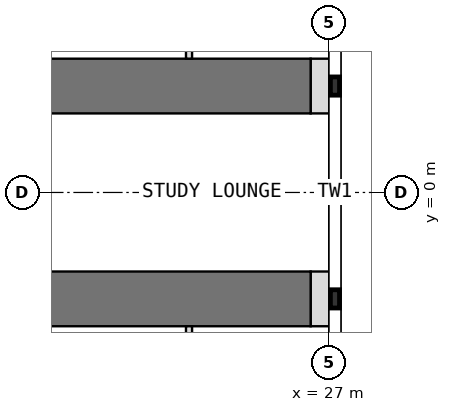
"""IFC4 building model, lengths in metres.
Left out: names, types, materials, properties, quantities, classifications, styles, units other than length and angle.
Written with IfcOpenShell. Run it as: python <this file> out.ifc"""

import sys

from ifc_helpers import new_model, si_unit, direction, frame, frame_2d, origin, place, context, subcontext, project, spatial, rectangle, extrude, element, save


model = new_model("IFC4")
c1 = context("Model", 3, precision=1e-05, world=origin(), true_north=direction((0.0, 1.0)))
c2 = subcontext(c1, "Body", "Model", "MODEL_VIEW")
j1 = project(units=[si_unit("LENGTHUNIT", "METRE"), si_unit("PLANEANGLEUNIT", "RADIAN")], contexts=[c1])
p1 = place(None, origin())
s1 = spatial("IfcSite", under=j1, at=p1, CompositionType="ELEMENT")
p2 = place(p1, origin())
s2 = spatial("IfcBuilding", under=s1, at=p2, CompositionType="ELEMENT")
p3 = place(p2, frame((0.0, 0.0, 84.5)))
s3 = spatial("IfcBuildingStorey", under=s2, at=p3, CompositionType="ELEMENT", Elevation=84.5)
p4 = place(p3, frame((13.5, 1.75, 0.0), z_axis=(0.0, 0.0, 1.0), x_axis=(1.0, 0.0, 0.0)))
e1 = element("IfcWall", 1, at=p4, inside=s3, PredefinedType="SHEAR", context=c2, shape_type="SweptSolid", body=[
    extrude(rectangle(XDim=13.2, YDim=0.9, at=frame_2d((6.6, 0.0))), origin(), (0.0, 0.0, 1.0), 4.0),
])
p5 = place(p4, frame((0.55, 0.0, 0.0)))
e2 = element("IfcOpeningElement", 2, at=p5, cuts=e1, PredefinedType="OPENING", context=c2, shape_type="SweptSolid", body=[
    extrude(rectangle(XDim=0.9, YDim=2.1, at=frame_2d((0.45, 1.05))), frame((0.0, 0.46, 0.0), z_axis=(0.0, -1.0, 0.0), x_axis=(1.0, 0.0, 0.0)), (0.0, 0.0, 1.0), 0.92),
])
p6 = place(p4, frame((2.8, 0.0, 0.0)))
e3 = element("IfcOpeningElement", 3, at=p6, cuts=e1, PredefinedType="OPENING", context=c2, shape_type="SweptSolid", body=[
    extrude(rectangle(XDim=0.9, YDim=2.1, at=frame_2d((0.45, 1.05))), frame((0.0, 0.46, 0.0), z_axis=(0.0, -1.0, 0.0), x_axis=(1.0, 0.0, 0.0)), (0.0, 0.0, 1.0), 0.92),
])
p7 = place(p4, frame((7.3, 0.0, 0.0)))
e4 = element("IfcOpeningElement", 4, at=p7, cuts=e1, PredefinedType="OPENING", context=c2, shape_type="SweptSolid", body=[
    extrude(rectangle(XDim=0.9, YDim=2.1, at=frame_2d((0.45, 1.05))), frame((0.0, 0.46, 0.0), z_axis=(0.0, -1.0, 0.0), x_axis=(1.0, 0.0, 0.0)), (0.0, 0.0, 1.0), 0.92),
])
p8 = place(p3, frame((13.5, -1.75, 0.0), z_axis=(0.0, 0.0, 1.0), x_axis=(1.0, 0.0, 0.0)))
e5 = element("IfcWall", 5, at=p8, inside=s3, PredefinedType="SHEAR", context=c2, shape_type="SweptSolid", body=[
    extrude(rectangle(XDim=13.2, YDim=0.9, at=frame_2d((6.6, 0.0))), origin(), (0.0, 0.0, 1.0), 4.0),
])
p9 = place(p8, frame((0.55, 0.0, 0.0)))
e6 = element("IfcOpeningElement", 6, at=p9, cuts=e5, PredefinedType="OPENING", context=c2, shape_type="SweptSolid", body=[
    extrude(rectangle(XDim=0.9, YDim=2.1, at=frame_2d((0.45, 1.05))), frame((0.0, 0.46, 0.0), z_axis=(0.0, -1.0, 0.0), x_axis=(1.0, 0.0, 0.0)), (0.0, 0.0, 1.0), 0.92),
])
p10 = place(p8, frame((2.8, 0.0, 0.0)))
e7 = element("IfcOpeningElement", 7, at=p10, cuts=e5, PredefinedType="OPENING", context=c2, shape_type="SweptSolid", body=[
    extrude(rectangle(XDim=0.9, YDim=2.1, at=frame_2d((0.45, 1.05))), frame((0.0, 0.46, 0.0), z_axis=(0.0, -1.0, 0.0), x_axis=(1.0, 0.0, 0.0)), (0.0, 0.0, 1.0), 0.92),
])
p11 = place(p8, frame((7.3, 0.0, 0.0)))
e8 = element("IfcOpeningElement", 8, at=p11, cuts=e5, PredefinedType="OPENING", context=c2, shape_type="SweptSolid", body=[
    extrude(rectangle(XDim=0.9, YDim=2.1, at=frame_2d((0.45, 1.05))), frame((0.0, 0.46, 0.0), z_axis=(0.0, -1.0, 0.0), x_axis=(1.0, 0.0, 0.0)), (0.0, 0.0, 1.0), 0.92),
])
for number, where, z_axis, x_axis in (
    (9, (26.7, 1.75, 0.0), (0.0, 0.0, 1.0), (1.0, 0.0, 0.0)),
    (10, (26.7, -1.75, 0.0), (0.0, 0.0, 1.0), (1.0, 0.0, 0.0)),
):
    element("IfcWall", number, at=place(p3, frame(where, z_axis=z_axis, x_axis=x_axis)), inside=s3, PredefinedType="PARTITIONING", context=c2, shape_type="SweptSolid", body=[
        extrude(rectangle(XDim=0.31, YDim=0.9, at=frame_2d((0.155, 0.0))), origin(), (0.0, 0.0, 1.0), 3.8),
    ])
for number, where, z_axis, x_axis in (
    (11, (24.7, 2.2, 0.0), (0.0, 0.0, 1.0), (0.0, 1.0, 0.0)),
    (12, (24.7, -2.2, 0.0), (0.0, 0.0, 1.0), (0.0, -1.0, 0.0)),
):
    element("IfcWall", number, at=place(p3, frame(where, z_axis=z_axis, x_axis=x_axis)), inside=s3, PredefinedType="PARTITIONING", context=c2, shape_type="SweptSolid", body=[
        extrude(rectangle(XDim=3.4, YDim=0.1, at=frame_2d((1.7, 0.0))), origin(), (0.0, 0.0, 1.0), 3.8),
    ])
save(model, sys.argv[1])
